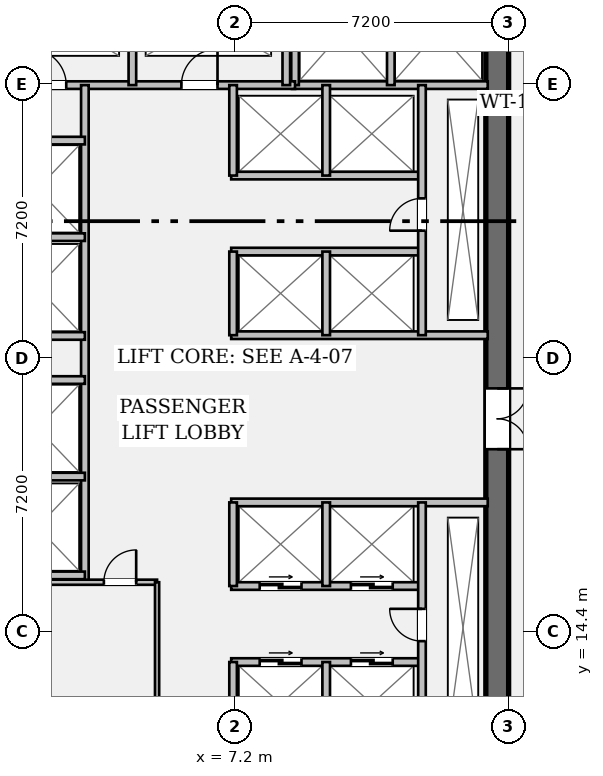
"""IFC4 building model, lengths in metres.
Left out: names, types, materials, properties, quantities, classifications, styles, units other than length and angle.
Written with IfcOpenShell. Run it as: python <this file> out.ifc"""

import sys

from ifc_helpers import new_model, si_unit, direction, frame, frame_2d, origin, place, context, subcontext, project, spatial, rectangle, extrude, element, fill, save


model = new_model("IFC4")
c1 = context("Model", 3, precision=1e-05, world=origin(), true_north=direction((0.0, 1.0)))
c2 = subcontext(c1, "Body", "Model", "MODEL_VIEW")
j1 = project(units=[si_unit("LENGTHUNIT", "METRE"), si_unit("PLANEANGLEUNIT", "RADIAN")], contexts=[c1])
p1 = place(None, origin())
s1 = spatial("IfcSite", under=j1, at=p1, CompositionType="ELEMENT")
p2 = place(p1, origin())
s2 = spatial("IfcBuilding", under=s1, at=p2, CompositionType="ELEMENT")
p3 = place(p2, frame((0.0, 0.0, 102.2)))
s3 = spatial("IfcBuildingStorey", under=s2, at=p3, CompositionType="ELEMENT", Elevation=102.2)
p4 = place(p3, frame((14.1, 35.4, 0.0), z_axis=(0.0, 0.0, 1.0), x_axis=(0.0, -1.0, 0.0)))
e1 = element("IfcWall", 1, at=p4, inside=s3, PredefinedType="SHEAR", context=c2, shape_type="SweptSolid", body=[
    extrude(rectangle(XDim=27.6, YDim=0.6, at=frame_2d((13.8, 0.0))), origin(), (0.0, 0.0, 1.0), 3.58),
])
p5 = place(p4, frame((1.3, 0.0, 0.0)))
e2 = element("IfcOpeningElement", 2, at=p5, cuts=e1, PredefinedType="OPENING", context=c2, shape_type="SweptSolid", body=[
    extrude(rectangle(XDim=1.2, YDim=2.15, at=frame_2d((0.6, 1.075))), frame((0.0, 0.312, 0.0), z_axis=(0.0, -1.0, 0.0), x_axis=(1.0, 0.0, 0.0)), (0.0, 0.0, 1.0), 0.624),
])
p6 = place(p4, frame((25.25, 0.0, 0.0)))
e3 = element("IfcOpeningElement", 3, at=p6, cuts=e1, PredefinedType="OPENING", context=c2, shape_type="SweptSolid", body=[
    extrude(rectangle(XDim=1.2, YDim=2.15, at=frame_2d((0.6, 1.075))), frame((0.0, 0.312, 0.0), z_axis=(0.0, -1.0, 0.0), x_axis=(1.0, 0.0, 0.0)), (0.0, 0.0, 1.0), 0.624),
])
p7 = place(p4, frame((14.6, 0.0, 0.0)))
e4 = element("IfcOpeningElement", 4, at=p7, cuts=e1, PredefinedType="OPENING", context=c2, shape_type="SweptSolid", body=[
    extrude(rectangle(XDim=1.6, YDim=2.2, at=frame_2d((0.8, 1.1))), frame((0.0, 0.312, 0.0), z_axis=(0.0, -1.0, 0.0), x_axis=(1.0, 0.0, 0.0)), (0.0, 0.0, 1.0), 0.624),
])
p8 = place(p3, frame((8.7, 28.78, 0.0), z_axis=(0.0, 0.0, 1.0), x_axis=(1.0, 0.0, 0.0)))
e5 = element("IfcWall", 5, at=p8, inside=s3, PredefinedType="PARTITIONING", context=c2, shape_type="SweptSolid", body=[
    extrude(rectangle(XDim=5.15, YDim=0.2, at=frame_2d((2.575, 0.0))), origin(), (0.0, 0.0, 1.0), 3.58),
])
for number, where, z_axis, x_axis in (
    (6, (8.78, 28.78, 0.0), (0.0, 0.0, 1.0), (0.0, 1.0, 0.0)),
    (7, (11.3, 28.78, 0.0), (0.0, 0.0, 1.0), (0.0, 1.0, 0.0)),
):
    element("IfcWall", number, at=place(p3, frame(where, z_axis=z_axis, x_axis=x_axis)), inside=s3, PredefinedType="PARTITIONING", context=c2, shape_type="SweptSolid", body=[
        extrude(rectangle(XDim=3.1, YDim=0.2, at=frame_2d((1.55, 0.0))), origin(), (0.0, 0.0, 1.0), 3.58),
    ])
p9 = place(p3, frame((0.6, 28.78, 0.0), z_axis=(0.0, 0.0, 1.0), x_axis=(1.0, 0.0, 0.0)))
e8 = element("IfcWall", 8, at=p9, inside=s3, PredefinedType="PARTITIONING", context=c2, shape_type="SweptSolid", body=[
    extrude(rectangle(XDim=8.18, YDim=0.2, at=frame_2d((4.09, 0.0))), origin(), (0.0, 0.0, 1.0), 3.58),
])
p10 = place(p9, frame((1.21, 0.0, 0.0)))
e9 = element("IfcOpeningElement", 9, at=p10, cuts=e8, PredefinedType="OPENING", context=c2, shape_type="SweptSolid", body=[
    extrude(rectangle(XDim=0.95, YDim=2.15, at=frame_2d((0.475, 1.075))), frame((0.0, 0.112, 0.0), z_axis=(0.0, -1.0, 0.0), x_axis=(1.0, 0.0, 0.0)), (0.0, 0.0, 1.0), 0.224),
])
p11 = place(p9, frame((5.19, 0.0, 0.0)))
e10 = element("IfcOpeningElement", 10, at=p11, cuts=e8, PredefinedType="OPENING", context=c2, shape_type="SweptSolid", body=[
    extrude(rectangle(XDim=0.95, YDim=2.15, at=frame_2d((0.475, 1.075))), frame((0.0, 0.112, 0.0), z_axis=(0.0, -1.0, 0.0), x_axis=(1.0, 0.0, 0.0)), (0.0, 0.0, 1.0), 0.224),
])
for number, where, z_axis, x_axis in (
    (11, (4.5, 28.78, 0.0), (0.0, 0.0, 1.0), (0.0, 1.0, 0.0)),
    (12, (8.55, 28.78, 0.0), (0.0, 0.0, 1.0), (0.0, 1.0, 0.0)),
):
    element("IfcWall", number, at=place(p3, frame(where, z_axis=z_axis, x_axis=x_axis)), inside=s3, PredefinedType="PARTITIONING", context=c2, shape_type="SweptSolid", body=[
        extrude(rectangle(XDim=2.94, YDim=0.2, at=frame_2d((1.47, 0.0))), origin(), (0.0, 0.0, 1.0), 3.58),
    ])
p12 = place(p3, frame((3.25, 15.7, 0.0), z_axis=(0.0, 0.0, 1.0), x_axis=(0.0, 1.0, 0.0)))
e13 = element("IfcWall", 13, at=p12, inside=s3, PredefinedType="PARTITIONING", context=c2, shape_type="SweptSolid", body=[
    extrude(rectangle(XDim=13.08, YDim=0.2, at=frame_2d((6.54, 0.0))), origin(), (0.0, 0.0, 1.0), 3.58),
])
for number, where, z_axis, x_axis in (
    (14, (0.6, 15.88, 0.0), (0.0, 0.0, 1.0), (1.0, 0.0, 0.0)),
    (15, (0.6, 18.48, 0.0), (0.0, 0.0, 1.0), (1.0, 0.0, 0.0)),
    (16, (0.6, 22.18, 0.0), (0.0, 0.0, 1.0), (1.0, 0.0, 0.0)),
    (17, (0.6, 24.78, 0.0), (0.0, 0.0, 1.0), (1.0, 0.0, 0.0)),
    (18, (0.6, 21.02, 0.0), (0.0, 0.0, 1.0), (1.0, 0.0, 0.0)),
    (19, (0.6, 27.32, 0.0), (0.0, 0.0, 1.0), (1.0, 0.0, 0.0)),
):
    element("IfcWall", number, at=place(p3, frame(where, z_axis=z_axis, x_axis=x_axis)), inside=s3, PredefinedType="PARTITIONING", context=c2, shape_type="SweptSolid", body=[
        extrude(rectangle(XDim=2.65, YDim=0.2, at=frame_2d((1.325, 0.0))), origin(), (0.0, 0.0, 1.0), 3.58),
    ])
p13 = place(p3, frame((7.1, 22.2, 0.0), z_axis=(0.0, 0.0, 1.0), x_axis=(1.0, 0.0, 0.0)))
e20 = element("IfcWall", 20, at=p13, inside=s3, PredefinedType="PARTITIONING", context=c2, shape_type="SweptSolid", body=[
    extrude(rectangle(XDim=6.75, YDim=0.2, at=frame_2d((3.375, 0.0))), origin(), (0.0, 0.0, 1.0), 3.58),
])
for number, where, z_axis, x_axis in (
    (21, (7.1, 24.4, 0.0), (0.0, 0.0, 1.0), (1.0, 0.0, 0.0)),
    (22, (7.1, 26.4, 0.0), (0.0, 0.0, 1.0), (1.0, 0.0, 0.0)),
):
    element("IfcWall", number, at=place(p3, frame(where, z_axis=z_axis, x_axis=x_axis)), inside=s3, PredefinedType="PARTITIONING", context=c2, shape_type="SweptSolid", body=[
        extrude(rectangle(XDim=5.02, YDim=0.2, at=frame_2d((2.51, 0.0))), origin(), (0.0, 0.0, 1.0), 3.58),
    ])
p14 = place(p3, frame((7.15, 22.2, 0.0), z_axis=(0.0, 0.0, 1.0), x_axis=(0.0, 1.0, 0.0)))
e23 = element("IfcWall", 23, at=p14, inside=s3, PredefinedType="PARTITIONING", context=c2, shape_type="SweptSolid", body=[
    extrude(rectangle(XDim=2.2, YDim=0.2, at=frame_2d((1.1, 0.0))), origin(), (0.0, 0.0, 1.0), 3.58),
])
p15 = place(p3, frame((7.15, 26.4, 0.0), z_axis=(0.0, 0.0, 1.0), x_axis=(0.0, 1.0, 0.0)))
e24 = element("IfcWall", 24, at=p15, inside=s3, PredefinedType="PARTITIONING", context=c2, shape_type="SweptSolid", body=[
    extrude(rectangle(XDim=2.38, YDim=0.2, at=frame_2d((1.19, 0.0))), origin(), (0.0, 0.0, 1.0), 3.58),
])
p16 = place(p3, frame((9.6, 22.2, 0.0), z_axis=(0.0, 0.0, 1.0), x_axis=(0.0, 1.0, 0.0)))
e25 = element("IfcWall", 25, at=p16, inside=s3, PredefinedType="PARTITIONING", context=c2, shape_type="SweptSolid", body=[
    extrude(rectangle(XDim=2.2, YDim=0.2, at=frame_2d((1.1, 0.0))), origin(), (0.0, 0.0, 1.0), 3.58),
])
p17 = place(p3, frame((9.6, 26.4, 0.0), z_axis=(0.0, 0.0, 1.0), x_axis=(0.0, 1.0, 0.0)))
e26 = element("IfcWall", 26, at=p17, inside=s3, PredefinedType="PARTITIONING", context=c2, shape_type="SweptSolid", body=[
    extrude(rectangle(XDim=2.38, YDim=0.2, at=frame_2d((1.19, 0.0))), origin(), (0.0, 0.0, 1.0), 3.58),
])
p18 = place(p3, frame((12.12, 22.2, 0.0), z_axis=(0.0, 0.0, 1.0), x_axis=(0.0, 1.0, 0.0)))
e27 = element("IfcWall", 27, at=p18, inside=s3, PredefinedType="PARTITIONING", context=c2, shape_type="SweptSolid", body=[
    extrude(rectangle(XDim=6.58, YDim=0.2, at=frame_2d((3.29, 0.0))), origin(), (0.0, 0.0, 1.0), 3.58),
])
p19 = place(p18, frame((2.75, 0.0, 0.0)))
e28 = element("IfcOpeningElement", 28, at=p19, cuts=e27, PredefinedType="OPENING", context=c2, shape_type="SweptSolid", body=[
    extrude(rectangle(XDim=0.85, YDim=2.15, at=frame_2d((0.425, 1.075))), frame((0.0, 0.112, 0.0), z_axis=(0.0, -1.0, 0.0), x_axis=(1.0, 0.0, 0.0)), (0.0, 0.0, 1.0), 0.224),
])
p20 = place(p3, frame((7.1, 17.8, 0.0), z_axis=(0.0, 0.0, 1.0), x_axis=(1.0, 0.0, 0.0)))
e29 = element("IfcWall", 29, at=p20, inside=s3, PredefinedType="PARTITIONING", context=c2, shape_type="SweptSolid", body=[
    extrude(rectangle(XDim=6.75, YDim=0.2, at=frame_2d((3.375, 0.0))), origin(), (0.0, 0.0, 1.0), 3.58),
])
p21 = place(p3, frame((7.1, 15.6, 0.0), z_axis=(0.0, 0.0, 1.0), x_axis=(1.0, 0.0, 0.0)))
e30 = element("IfcWall", 30, at=p21, inside=s3, PredefinedType="PARTITIONING", context=c2, shape_type="SweptSolid", body=[
    extrude(rectangle(XDim=5.02, YDim=0.2, at=frame_2d((2.51, 0.0))), origin(), (0.0, 0.0, 1.0), 3.58),
])
p22 = place(p21, frame((0.75, 0.0, 0.0)))
e31 = element("IfcOpeningElement", 31, at=p22, cuts=e30, PredefinedType="OPENING", context=c2, shape_type="SweptSolid", body=[
    extrude(rectangle(XDim=1.1, YDim=2.2, at=frame_2d((0.55, 1.1))), frame((0.0, 0.112, 0.0), z_axis=(0.0, -1.0, 0.0), x_axis=(1.0, 0.0, 0.0)), (0.0, 0.0, 1.0), 0.224),
])
p23 = place(p21, frame((3.15, 0.0, 0.0)))
e32 = element("IfcOpeningElement", 32, at=p23, cuts=e30, PredefinedType="OPENING", context=c2, shape_type="SweptSolid", body=[
    extrude(rectangle(XDim=1.1, YDim=2.2, at=frame_2d((0.55, 1.1))), frame((0.0, 0.112, 0.0), z_axis=(0.0, -1.0, 0.0), x_axis=(1.0, 0.0, 0.0)), (0.0, 0.0, 1.0), 0.224),
])
p24 = place(p3, frame((7.1, 13.6, 0.0), z_axis=(0.0, 0.0, 1.0), x_axis=(1.0, 0.0, 0.0)))
e33 = element("IfcWall", 33, at=p24, inside=s3, PredefinedType="PARTITIONING", context=c2, shape_type="SweptSolid", body=[
    extrude(rectangle(XDim=5.02, YDim=0.2, at=frame_2d((2.51, 0.0))), origin(), (0.0, 0.0, 1.0), 3.58),
])
p25 = place(p24, frame((0.75, 0.0, 0.0)))
e34 = element("IfcOpeningElement", 34, at=p25, cuts=e33, PredefinedType="OPENING", context=c2, shape_type="SweptSolid", body=[
    extrude(rectangle(XDim=1.1, YDim=2.2, at=frame_2d((0.55, 1.1))), frame((0.0, 0.112, 0.0), z_axis=(0.0, -1.0, 0.0), x_axis=(1.0, 0.0, 0.0)), (0.0, 0.0, 1.0), 0.224),
])
p26 = place(p24, frame((3.15, 0.0, 0.0)))
e35 = element("IfcOpeningElement", 35, at=p26, cuts=e33, PredefinedType="OPENING", context=c2, shape_type="SweptSolid", body=[
    extrude(rectangle(XDim=1.1, YDim=2.2, at=frame_2d((0.55, 1.1))), frame((0.0, 0.112, 0.0), z_axis=(0.0, -1.0, 0.0), x_axis=(1.0, 0.0, 0.0)), (0.0, 0.0, 1.0), 0.224),
])
p27 = place(p3, frame((7.15, 15.6, 0.0), z_axis=(0.0, 0.0, 1.0), x_axis=(0.0, 1.0, 0.0)))
e36 = element("IfcWall", 36, at=p27, inside=s3, PredefinedType="PARTITIONING", context=c2, shape_type="SweptSolid", body=[
    extrude(rectangle(XDim=2.2, YDim=0.2, at=frame_2d((1.1, 0.0))), origin(), (0.0, 0.0, 1.0), 3.58),
])
p28 = place(p3, frame((7.15, 11.2, 0.0), z_axis=(0.0, 0.0, 1.0), x_axis=(0.0, 1.0, 0.0)))
e37 = element("IfcWall", 37, at=p28, inside=s3, PredefinedType="PARTITIONING", context=c2, shape_type="SweptSolid", body=[
    extrude(rectangle(XDim=2.4, YDim=0.2, at=frame_2d((1.2, 0.0))), origin(), (0.0, 0.0, 1.0), 3.58),
])
p29 = place(p3, frame((9.6, 15.6, 0.0), z_axis=(0.0, 0.0, 1.0), x_axis=(0.0, 1.0, 0.0)))
e38 = element("IfcWall", 38, at=p29, inside=s3, PredefinedType="PARTITIONING", context=c2, shape_type="SweptSolid", body=[
    extrude(rectangle(XDim=2.2, YDim=0.2, at=frame_2d((1.1, 0.0))), origin(), (0.0, 0.0, 1.0), 3.58),
])
p30 = place(p3, frame((9.6, 11.2, 0.0), z_axis=(0.0, 0.0, 1.0), x_axis=(0.0, 1.0, 0.0)))
e39 = element("IfcWall", 39, at=p30, inside=s3, PredefinedType="PARTITIONING", context=c2, shape_type="SweptSolid", body=[
    extrude(rectangle(XDim=2.4, YDim=0.2, at=frame_2d((1.2, 0.0))), origin(), (0.0, 0.0, 1.0), 3.58),
])
p31 = place(p3, frame((12.12, 11.2, 0.0), z_axis=(0.0, 0.0, 1.0), x_axis=(0.0, 1.0, 0.0)))
e40 = element("IfcWall", 40, at=p31, inside=s3, PredefinedType="PARTITIONING", context=c2, shape_type="SweptSolid", body=[
    extrude(rectangle(XDim=6.6, YDim=0.2, at=frame_2d((3.3, 0.0))), origin(), (0.0, 0.0, 1.0), 3.58),
])
p32 = place(p31, frame((2.95, 0.0, 0.0)))
e41 = element("IfcOpeningElement", 41, at=p32, cuts=e40, PredefinedType="OPENING", context=c2, shape_type="SweptSolid", body=[
    extrude(rectangle(XDim=0.85, YDim=2.15, at=frame_2d((0.425, 1.075))), frame((0.0, 0.112, 0.0), z_axis=(0.0, -1.0, 0.0), x_axis=(1.0, 0.0, 0.0)), (0.0, 0.0, 1.0), 0.224),
])
p33 = place(p3, frame((0.6, 15.7, 0.0), z_axis=(0.0, 0.0, 1.0), x_axis=(1.0, 0.0, 0.0)))
e42 = element("IfcWall", 42, at=p33, inside=s3, PredefinedType="PARTITIONING", context=c2, shape_type="SweptSolid", body=[
    extrude(rectangle(XDim=4.55, YDim=0.135, at=frame_2d((2.275, 0.0))), origin(), (0.0, 0.0, 1.0), 3.58),
])
p34 = place(p33, frame((3.15, 0.0, 0.0)))
e43 = element("IfcOpeningElement", 43, at=p34, cuts=e42, PredefinedType="OPENING", context=c2, shape_type="SweptSolid", body=[
    extrude(rectangle(XDim=0.85, YDim=2.15, at=frame_2d((0.425, 1.075))), frame((0.0, 0.08, 0.0), z_axis=(0.0, -1.0, 0.0), x_axis=(1.0, 0.0, 0.0)), (0.0, 0.0, 1.0), 0.159),
])
p35 = place(p3, frame((5.15, 11.28, 0.0), z_axis=(0.0, 0.0, 1.0), x_axis=(0.0, 1.0, 0.0)))
e44 = element("IfcWall", 44, at=p35, inside=s3, PredefinedType="PARTITIONING", context=c2, shape_type="SweptSolid", body=[
    extrude(rectangle(XDim=4.42, YDim=0.11, at=frame_2d((2.21, 0.0))), origin(), (0.0, 0.0, 1.0), 3.58),
])
p36 = place(p10, origin())
e45 = element("IfcDoor", 45, at=p36, inside=s3, OperationType="SINGLE_SWING_LEFT", PredefinedType="DOOR", context=c2, shape_type="SweptSolid", body=[
    extrude(rectangle(XDim=0.95, YDim=2.15, at=frame_2d((0.475, 1.075))), frame((0.0, 0.025, 0.0), z_axis=(0.0, -1.0, 0.0), x_axis=(1.0, 0.0, 0.0)), (0.0, 0.0, 1.0), 0.05),
])
fill(e9, e45)
p37 = place(p11, origin())
e46 = element("IfcDoor", 46, at=p37, inside=s3, OperationType="SINGLE_SWING_RIGHT", PredefinedType="DOOR", context=c2, shape_type="SweptSolid", body=[
    extrude(rectangle(XDim=0.95, YDim=2.15, at=frame_2d((0.475, 1.075))), frame((0.0, 0.025, 0.0), z_axis=(0.0, -1.0, 0.0), x_axis=(1.0, 0.0, 0.0)), (0.0, 0.0, 1.0), 0.05),
])
fill(e10, e46)
p38 = place(p7, origin())
e47 = element("IfcDoor", 47, at=p38, inside=s3, OperationType="DOUBLE_DOOR_SINGLE_SWING", PredefinedType="DOOR", context=c2, shape_type="SweptSolid", body=[
    extrude(rectangle(XDim=1.6, YDim=2.2, at=frame_2d((0.8, 1.1))), frame((0.0, 0.025, 0.0), z_axis=(0.0, -1.0, 0.0), x_axis=(1.0, 0.0, 0.0)), (0.0, 0.0, 1.0), 0.05),
])
fill(e4, e47)
p39 = place(p19, origin())
e48 = element("IfcDoor", 48, at=p39, inside=s3, OperationType="SINGLE_SWING_LEFT", PredefinedType="DOOR", context=c2, shape_type="SweptSolid", body=[
    extrude(rectangle(XDim=0.85, YDim=2.15, at=frame_2d((0.425, 1.075))), frame((0.0, 0.025, 0.0), z_axis=(0.0, -1.0, 0.0), x_axis=(1.0, 0.0, 0.0)), (0.0, 0.0, 1.0), 0.05),
])
fill(e28, e48)
p40 = place(p32, origin())
e49 = element("IfcDoor", 49, at=p40, inside=s3, OperationType="SINGLE_SWING_RIGHT", PredefinedType="DOOR", context=c2, shape_type="SweptSolid", body=[
    extrude(rectangle(XDim=0.85, YDim=2.15, at=frame_2d((0.425, 1.075))), frame((0.0, 0.025, 0.0), z_axis=(0.0, -1.0, 0.0), x_axis=(1.0, 0.0, 0.0)), (0.0, 0.0, 1.0), 0.05),
])
fill(e41, e49)
p41 = place(p22, origin())
e50 = element("IfcDoor", 50, at=p41, inside=s3, OperationType="DOUBLE_DOOR_SLIDING", PredefinedType="DOOR", context=c2, shape_type="SweptSolid", body=[
    extrude(rectangle(XDim=1.1, YDim=2.2, at=frame_2d((0.55, 1.1))), frame((0.0, 0.025, 0.0), z_axis=(0.0, -1.0, 0.0), x_axis=(1.0, 0.0, 0.0)), (0.0, 0.0, 1.0), 0.05),
])
fill(e31, e50)
p42 = place(p23, origin())
e51 = element("IfcDoor", 51, at=p42, inside=s3, OperationType="DOUBLE_DOOR_SLIDING", PredefinedType="DOOR", context=c2, shape_type="SweptSolid", body=[
    extrude(rectangle(XDim=1.1, YDim=2.2, at=frame_2d((0.55, 1.1))), frame((0.0, 0.025, 0.0), z_axis=(0.0, -1.0, 0.0), x_axis=(1.0, 0.0, 0.0)), (0.0, 0.0, 1.0), 0.05),
])
fill(e32, e51)
p43 = place(p25, origin())
e52 = element("IfcDoor", 52, at=p43, inside=s3, OperationType="DOUBLE_DOOR_SLIDING", PredefinedType="DOOR", context=c2, shape_type="SweptSolid", body=[
    extrude(rectangle(XDim=1.1, YDim=2.2, at=frame_2d((0.55, 1.1))), frame((0.0, 0.025, 0.0), z_axis=(0.0, -1.0, 0.0), x_axis=(1.0, 0.0, 0.0)), (0.0, 0.0, 1.0), 0.05),
])
fill(e34, e52)
p44 = place(p26, origin())
e53 = element("IfcDoor", 53, at=p44, inside=s3, OperationType="DOUBLE_DOOR_SLIDING", PredefinedType="DOOR", context=c2, shape_type="SweptSolid", body=[
    extrude(rectangle(XDim=1.1, YDim=2.2, at=frame_2d((0.55, 1.1))), frame((0.0, 0.025, 0.0), z_axis=(0.0, -1.0, 0.0), x_axis=(1.0, 0.0, 0.0)), (0.0, 0.0, 1.0), 0.05),
])
fill(e35, e53)
p45 = place(p34, origin())
e54 = element("IfcDoor", 54, at=p45, inside=s3, OperationType="SINGLE_SWING_RIGHT", PredefinedType="DOOR", context=c2, shape_type="SweptSolid", body=[
    extrude(rectangle(XDim=0.85, YDim=2.15, at=frame_2d((0.425, 1.075))), frame((0.0, 0.025, 0.0), z_axis=(0.0, -1.0, 0.0), x_axis=(1.0, 0.0, 0.0)), (0.0, 0.0, 1.0), 0.05),
])
fill(e43, e54)
save(model, sys.argv[1])
